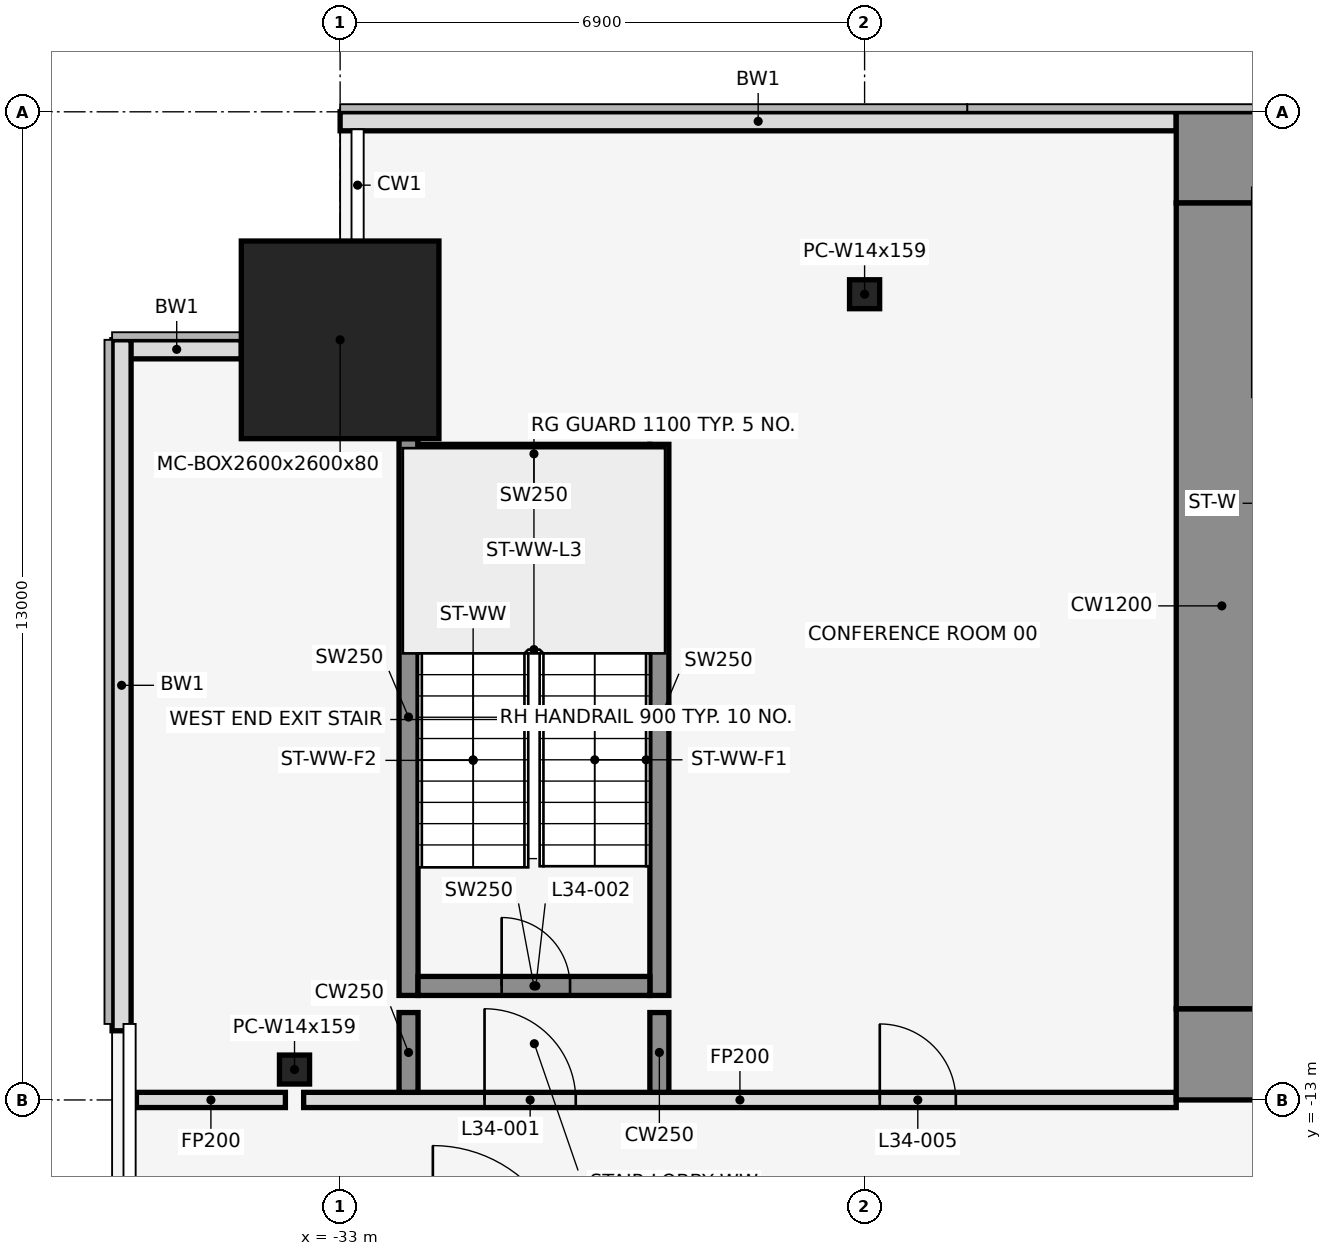
"""IFC4 building model, lengths in metres.
Left out: names, types, materials, properties, quantities, classifications, styles, units other than length and angle.
Written with IfcOpenShell. Run it as: python <this file> out.ifc"""

import sys

from ifc_helpers import new_model, si_unit, direction, frame, frame_2d, origin, origin_2d, place, context, subcontext, project, spatial, rectangle, hollow_rectangle, i_section, extrude, element, fill, save


model = new_model("IFC4")
c1 = context("Model", 3, precision=1e-05, world=origin(), true_north=direction((0.0, 1.0)))
c2 = subcontext(c1, "Body", "Model", "MODEL_VIEW")
j1 = project(units=[si_unit("LENGTHUNIT", "METRE"), si_unit("PLANEANGLEUNIT", "RADIAN")], contexts=[c1])
p1 = place(None, origin())
s1 = spatial("IfcSite", under=j1, at=p1, CompositionType="ELEMENT")
p2 = place(p1, origin())
s2 = spatial("IfcBuilding", under=s1, at=p2, CompositionType="ELEMENT")
p3 = place(p2, frame((0.0, 0.0, 156.8)))
s3 = spatial("IfcBuildingStorey", under=s2, at=p3, CompositionType="ELEMENT", Elevation=156.8)
p4 = place(p3, frame((-33.0, -3.0, 0.0), z_axis=(0.0, 0.0, 1.0), x_axis=(1.0, 0.0, 0.0)))
e1 = element("IfcColumn", 1, at=p4, inside=s3, PredefinedType="COLUMN", context=c2, shape_type="SweptSolid", body=[
    extrude(hollow_rectangle(XDim=2.6, YDim=2.6, WallThickness=0.08, at=origin_2d()), origin(), (0.0, 0.0, 1.0), 4.1),
])
for number, where, z_axis, x_axis in (
    (2, (-26.1, -2.4, 0.0), (0.0, 0.0, 1.0), (1.0, 0.0, 0.0)),
    (3, (-33.6, -12.6, 0.0), (0.0, 0.0, 1.0), (1.0, 0.0, 0.0)),
):
    element("IfcColumn", number, at=place(p3, frame(where, z_axis=z_axis, x_axis=x_axis)), inside=s3, PredefinedType="COLUMN", context=c2, shape_type="SweptSolid", body=[
        extrude(i_section(OverallWidth=0.396, OverallDepth=0.381, WebThickness=0.019, FlangeThickness=0.03, at=origin_2d()), origin(), (0.0, 0.0, 1.0), 4.1),
    ])
p5 = place(p3, frame((-22.0, -0.125, 0.0), z_axis=(0.0, 0.0, 1.0), x_axis=(-1.0, 0.0, 0.0)))
e4 = element("IfcWall", 4, at=p5, inside=s3, PredefinedType="STANDARD", context=c2, shape_type="SweptSolid", body=[
    extrude(rectangle(XDim=11.0, YDim=0.25, at=frame_2d((5.5, 0.0))), origin(), (0.0, 0.0, 1.0), 3.95),
])
p6 = place(p3, frame((-34.3, -3.125, 0.0), z_axis=(0.0, 0.0, 1.0), x_axis=(-1.0, 0.0, 0.0)))
e5 = element("IfcWall", 5, at=p6, inside=s3, PredefinedType="STANDARD", context=c2, shape_type="SweptSolid", body=[
    extrude(rectangle(XDim=1.7, YDim=0.25, at=frame_2d((0.85, 0.0))), origin(), (0.0, 0.0, 1.0), 3.95),
])
p7 = place(p3, frame((-35.875, -3.0, 0.0), z_axis=(0.0, 0.0, 1.0), x_axis=(0.0, -1.0, 0.0)))
e6 = element("IfcWall", 6, at=p7, inside=s3, PredefinedType="STANDARD", context=c2, shape_type="SweptSolid", body=[
    extrude(rectangle(XDim=9.09, YDim=0.25, at=frame_2d((4.545, 0.0))), origin(), (0.0, 0.0, 1.0), 3.95),
])
p8 = place(p3, frame((-32.1, -11.625, 0.0), z_axis=(0.0, 0.0, 1.0), x_axis=(0.0, 1.0, 0.0)))
e7 = element("IfcWall", 7, at=p8, inside=s3, PredefinedType="SHEAR", context=c2, shape_type="SweptSolid", body=[
    extrude(rectangle(XDim=7.325, YDim=0.25, at=frame_2d((3.663, 0.0))), origin(), (0.0, 0.0, 1.0), 4.1),
])
p9 = place(p3, frame((-28.8, -11.625, 0.0), z_axis=(0.0, 0.0, 1.0), x_axis=(0.0, 1.0, 0.0)))
e8 = element("IfcWall", 8, at=p9, inside=s3, PredefinedType="SHEAR", context=c2, shape_type="SweptSolid", body=[
    extrude(rectangle(XDim=7.25, YDim=0.25, at=frame_2d((3.625, 0.0))), origin(), (0.0, 0.0, 1.0), 4.1),
])
p10 = place(p3, frame((-31.975, -11.5, 0.0), z_axis=(0.0, 0.0, 1.0), x_axis=(1.0, 0.0, 0.0)))
e9 = element("IfcWall", 9, at=p10, inside=s3, PredefinedType="SHEAR", context=c2, shape_type="SweptSolid", body=[
    extrude(rectangle(XDim=3.05, YDim=0.25, at=frame_2d((1.525, 0.0))), origin(), (0.0, 0.0, 1.0), 4.1),
])
p11 = place(p10, frame((1.1, 0.0, 0.0)))
e10 = element("IfcOpeningElement", 10, at=p11, cuts=e9, PredefinedType="OPENING", context=c2, shape_type="SweptSolid", body=[
    extrude(rectangle(XDim=0.9, YDim=2.1, at=frame_2d((0.45, 1.05))), frame((0.0, 0.137, 0.0), z_axis=(0.0, -1.0, 0.0), x_axis=(1.0, 0.0, 0.0)), (0.0, 0.0, 1.0), 0.274),
])
p12 = place(p3, frame((-31.975, -4.5, 0.0), z_axis=(0.0, 0.0, 1.0), x_axis=(1.0, 0.0, 0.0)))
e11 = element("IfcWall", 11, at=p12, inside=s3, PredefinedType="SHEAR", context=c2, shape_type="SweptSolid", body=[
    extrude(rectangle(XDim=3.05, YDim=0.25, at=frame_2d((1.525, 0.0))), origin(), (0.0, 0.0, 1.0), 4.1),
])
p13 = place(p3, frame((-35.68, -13.0, 0.0), z_axis=(0.0, 0.0, 1.0), x_axis=(1.0, 0.0, 0.0)))
e12 = element("IfcWall", 12, at=p13, inside=s3, PredefinedType="PARTITIONING", context=c2, shape_type="SweptSolid", body=[
    extrude(rectangle(XDim=1.96, YDim=0.2, at=frame_2d((0.98, 0.0))), origin(), (0.0, 0.0, 1.0), 2.84),
])
p14 = place(p3, frame((-33.48, -13.0, 0.0), z_axis=(0.0, 0.0, 1.0), x_axis=(1.0, 0.0, 0.0)))
e13 = element("IfcWall", 13, at=p14, inside=s3, PredefinedType="PARTITIONING", context=c2, shape_type="SweptSolid", body=[
    extrude(rectangle(XDim=11.48, YDim=0.2, at=frame_2d((5.74, 0.0))), origin(), (0.0, 0.0, 1.0), 2.84),
])
p15 = place(p14, frame((2.38, 0.0, 0.0)))
e14 = element("IfcOpeningElement", 14, at=p15, cuts=e13, PredefinedType="OPENING", context=c2, shape_type="SweptSolid", body=[
    extrude(rectangle(XDim=1.2, YDim=2.1, at=frame_2d((0.6, 1.05))), frame((0.0, 0.112, 0.0), z_axis=(0.0, -1.0, 0.0), x_axis=(1.0, 0.0, 0.0)), (0.0, 0.0, 1.0), 0.224),
])
p16 = place(p14, frame((7.58, 0.0, 0.0)))
e15 = element("IfcOpeningElement", 15, at=p16, cuts=e13, PredefinedType="OPENING", context=c2, shape_type="SweptSolid", body=[
    extrude(rectangle(XDim=1.0, YDim=2.1, at=frame_2d((0.5, 1.05))), frame((0.0, 0.112, 0.0), z_axis=(0.0, -1.0, 0.0), x_axis=(1.0, 0.0, 0.0)), (0.0, 0.0, 1.0), 0.224),
])
for number, where, z_axis, x_axis in (
    (16, (-32.1, -12.9, 0.0), (0.0, 0.0, 1.0), (0.0, 1.0, 0.0)),
    (17, (-28.8, -12.9, 0.0), (0.0, 0.0, 1.0), (0.0, 1.0, 0.0)),
):
    element("IfcWall", number, at=place(p3, frame(where, z_axis=z_axis, x_axis=x_axis)), inside=s3, PredefinedType="SHEAR", context=c2, shape_type="SweptSolid", body=[
        extrude(rectangle(XDim=1.05, YDim=0.25, at=frame_2d((0.525, 0.0))), origin(), (0.0, 0.0, 1.0), 4.1),
    ])
p17 = place(p3, frame((-22.0, -0.6, 0.0), z_axis=(0.0, 0.0, 1.0), x_axis=(1.0, 0.0, 0.0)))
e18 = element("IfcWall", 18, at=p17, inside=s3, PredefinedType="SHEAR", context=c2, shape_type="SweptSolid", body=[
    extrude(rectangle(XDim=44.0, YDim=1.2, at=frame_2d((22.0, 0.0))), origin(), (0.0, 0.0, 1.0), 4.1),
])
p18 = place(p17, frame((18.55, 0.0, 0.0)))
e19 = element("IfcOpeningElement", 19, at=p18, cuts=e18, PredefinedType="OPENING", context=c2, shape_type="SweptSolid", body=[
    extrude(rectangle(XDim=0.9, YDim=2.1, at=frame_2d((0.45, 1.05))), frame((0.0, 0.612, 0.0), z_axis=(0.0, -1.0, 0.0), x_axis=(1.0, 0.0, 0.0)), (0.0, 0.0, 1.0), 1.224),
])
p19 = place(p17, frame((24.55, 0.0, 0.0)))
e20 = element("IfcOpeningElement", 20, at=p19, cuts=e18, PredefinedType="OPENING", context=c2, shape_type="SweptSolid", body=[
    extrude(rectangle(XDim=0.9, YDim=2.1, at=frame_2d((0.45, 1.05))), frame((0.0, 0.612, 0.0), z_axis=(0.0, -1.0, 0.0), x_axis=(1.0, 0.0, 0.0)), (0.0, 0.0, 1.0), 1.224),
])
p20 = place(p3, frame((-22.0, -12.4, 0.0), z_axis=(0.0, 0.0, 1.0), x_axis=(1.0, 0.0, 0.0)))
e21 = element("IfcWall", 21, at=p20, inside=s3, PredefinedType="SHEAR", context=c2, shape_type="SweptSolid", body=[
    extrude(rectangle(XDim=44.0, YDim=1.2, at=frame_2d((22.0, 0.0))), origin(), (0.0, 0.0, 1.0), 4.1),
])
p21 = place(p20, frame((2.2, 0.0, 0.0)))
e22 = element("IfcOpeningElement", 22, at=p21, cuts=e21, PredefinedType="OPENING", context=c2, shape_type="SweptSolid", body=[
    extrude(rectangle(XDim=1.2, YDim=2.1, at=frame_2d((0.6, 1.05))), frame((0.0, 0.612, 0.0), z_axis=(0.0, -1.0, 0.0), x_axis=(1.0, 0.0, 0.0)), (0.0, 0.0, 1.0), 1.224),
])
p22 = place(p20, frame((21.4, 0.0, 0.0)))
e23 = element("IfcOpeningElement", 23, at=p22, cuts=e21, PredefinedType="OPENING", context=c2, shape_type="SweptSolid", body=[
    extrude(rectangle(XDim=1.2, YDim=2.1, at=frame_2d((0.6, 1.05))), frame((0.0, 0.612, 0.0), z_axis=(0.0, -1.0, 0.0), x_axis=(1.0, 0.0, 0.0)), (0.0, 0.0, 1.0), 1.224),
])
p23 = place(p20, frame((40.6, 0.0, 0.0)))
e24 = element("IfcOpeningElement", 24, at=p23, cuts=e21, PredefinedType="OPENING", context=c2, shape_type="SweptSolid", body=[
    extrude(rectangle(XDim=1.2, YDim=2.1, at=frame_2d((0.6, 1.05))), frame((0.0, 0.612, 0.0), z_axis=(0.0, -1.0, 0.0), x_axis=(1.0, 0.0, 0.0)), (0.0, 0.0, 1.0), 1.224),
])
p24 = place(p20, frame((16.0, 0.0, 0.0)))
e25 = element("IfcOpeningElement", 25, at=p24, cuts=e21, PredefinedType="OPENING", context=c2, shape_type="SweptSolid", body=[
    extrude(rectangle(XDim=1.8, YDim=2.1, at=frame_2d((0.9, 1.05))), frame((0.0, 0.612, 0.0), z_axis=(0.0, -1.0, 0.0), x_axis=(1.0, 0.0, 0.0)), (0.0, 0.0, 1.0), 1.224),
])
p25 = place(p20, frame((6.3, 0.0, 0.0)))
e26 = element("IfcOpeningElement", 26, at=p25, cuts=e21, PredefinedType="OPENING", context=c2, shape_type="SweptSolid", body=[
    extrude(rectangle(XDim=1.2, YDim=2.1, at=frame_2d((0.6, 1.05))), frame((0.0, 0.612, 0.0), z_axis=(0.0, -1.0, 0.0), x_axis=(1.0, 0.0, 0.0)), (0.0, 0.0, 1.0), 1.224),
])
p26 = place(p20, frame((26.2, 0.0, 0.0)))
e27 = element("IfcOpeningElement", 27, at=p26, cuts=e21, PredefinedType="OPENING", context=c2, shape_type="SweptSolid", body=[
    extrude(rectangle(XDim=1.8, YDim=2.1, at=frame_2d((0.9, 1.05))), frame((0.0, 0.612, 0.0), z_axis=(0.0, -1.0, 0.0), x_axis=(1.0, 0.0, 0.0)), (0.0, 0.0, 1.0), 1.224),
])
p27 = place(p20, frame((36.5, 0.0, 0.0)))
e28 = element("IfcOpeningElement", 28, at=p27, cuts=e21, PredefinedType="OPENING", context=c2, shape_type="SweptSolid", body=[
    extrude(rectangle(XDim=1.2, YDim=2.1, at=frame_2d((0.6, 1.05))), frame((0.0, 0.612, 0.0), z_axis=(0.0, -1.0, 0.0), x_axis=(1.0, 0.0, 0.0)), (0.0, 0.0, 1.0), 1.224),
])
p28 = place(p3, frame((-21.4, -11.8, 0.0), z_axis=(0.0, 0.0, 1.0), x_axis=(0.0, 1.0, 0.0)))
e29 = element("IfcWall", 29, at=p28, inside=s3, PredefinedType="SHEAR", context=c2, shape_type="SweptSolid", body=[
    extrude(rectangle(XDim=10.6, YDim=1.2, at=frame_2d((5.3, 0.0))), origin(), (0.0, 0.0, 1.0), 4.1),
])
p29 = place(p15, origin())
e30 = element("IfcDoor", 30, at=p29, inside=s3, OperationType="SINGLE_SWING_LEFT", PredefinedType="DOOR", context=c2, shape_type="SweptSolid", body=[
    extrude(rectangle(XDim=1.2, YDim=2.1, at=frame_2d((0.6, 1.05))), frame((0.0, 0.025, 0.0), z_axis=(0.0, -1.0, 0.0), x_axis=(1.0, 0.0, 0.0)), (0.0, 0.0, 1.0), 0.05),
])
fill(e14, e30)
p30 = place(p11, origin())
e31 = element("IfcDoor", 31, at=p30, inside=s3, OperationType="SINGLE_SWING_LEFT", PredefinedType="DOOR", context=c2, shape_type="SweptSolid", body=[
    extrude(rectangle(XDim=0.9, YDim=2.1, at=frame_2d((0.45, 1.05))), frame((0.0, 0.025, 0.0), z_axis=(0.0, -1.0, 0.0), x_axis=(1.0, 0.0, 0.0)), (0.0, 0.0, 1.0), 0.05),
])
fill(e10, e31)
p31 = place(p16, origin())
e32 = element("IfcDoor", 32, at=p31, inside=s3, OperationType="SINGLE_SWING_LEFT", PredefinedType="DOOR", context=c2, shape_type="SweptSolid", body=[
    extrude(rectangle(XDim=1.0, YDim=2.1, at=frame_2d((0.5, 1.05))), frame((0.0, 0.025, 0.0), z_axis=(0.0, -1.0, 0.0), x_axis=(1.0, 0.0, 0.0)), (0.0, 0.0, 1.0), 0.05),
])
fill(e15, e32)
save(model, sys.argv[1])
